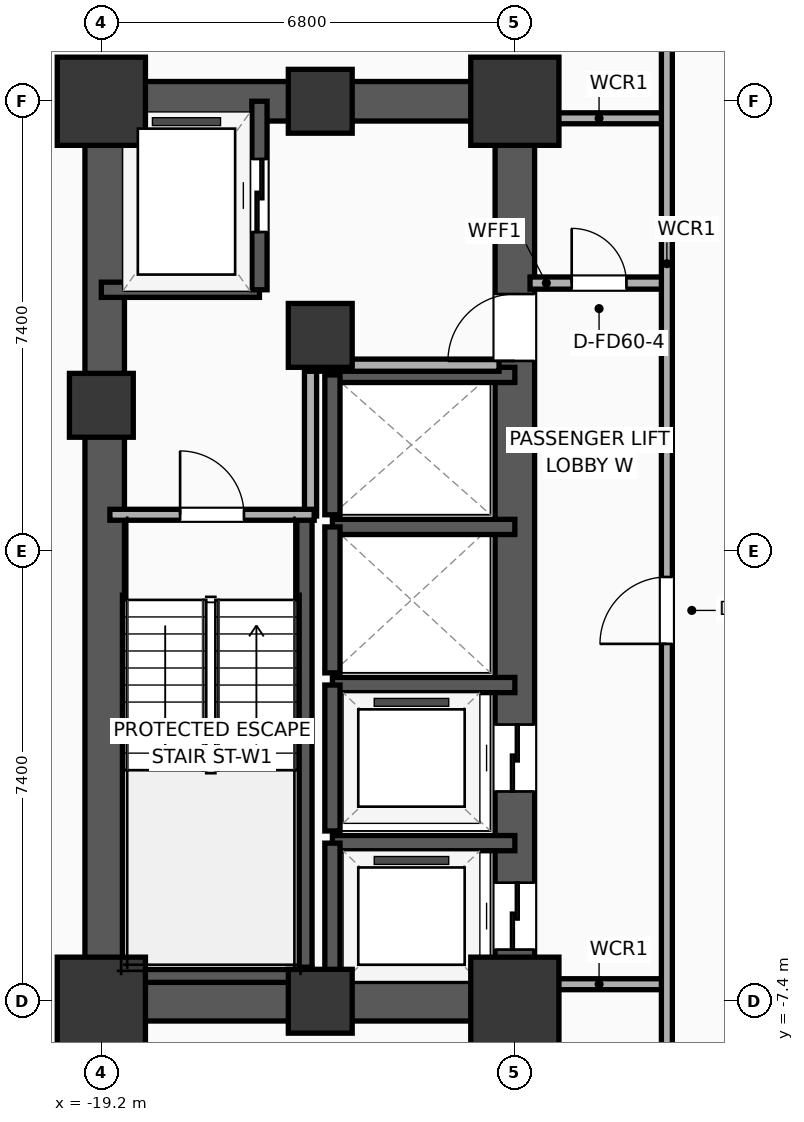
"""IFC4 building model, lengths in metres.
Left out: names, types, materials, properties, quantities, classifications, styles, units other than length and angle.
Written with IfcOpenShell. Run it as: python <this file> out.ifc"""

import sys

from ifc_helpers import new_model, si_unit, direction, frame, frame_2d, origin, origin_2d, place, context, subcontext, project, spatial, rectangle, extrude, element, fill, save


model = new_model("IFC4")
c1 = context("Model", 3, precision=1e-05, world=origin(), true_north=direction((0.0, 1.0)))
c2 = subcontext(c1, "Body", "Model", "MODEL_VIEW")
j1 = project(units=[si_unit("LENGTHUNIT", "METRE"), si_unit("PLANEANGLEUNIT", "RADIAN")], contexts=[c1])
p1 = place(None, origin())
s1 = spatial("IfcSite", under=j1, at=p1, CompositionType="ELEMENT")
p2 = place(p1, origin())
s2 = spatial("IfcBuilding", under=s1, at=p2, CompositionType="ELEMENT")
p3 = place(p2, frame((0.0, 0.0, 76.7)))
s3 = spatial("IfcBuildingStorey", under=s2, at=p3, CompositionType="ELEMENT", Elevation=76.7)
p4 = place(p3, frame((-19.2, -7.4, 0.0), z_axis=(0.0, 0.0, 1.0), x_axis=(1.0, 0.0, 0.0)))
e1 = element("IfcColumn", 1, at=p4, inside=s3, PredefinedType="COLUMN", context=c2, shape_type="SweptSolid", body=[
    extrude(rectangle(XDim=1.45, YDim=1.45, at=origin_2d()), origin(), (0.0, 0.0, 1.0), 3.9),
])
p5 = place(p3, frame((-19.2, 2.4, 0.0), z_axis=(0.0, 0.0, 1.0), x_axis=(1.0, 0.0, 0.0)))
e2 = element("IfcColumn", 2, at=p5, inside=s3, PredefinedType="COLUMN", context=c2, shape_type="SweptSolid", body=[
    extrude(rectangle(XDim=1.05, YDim=1.05, at=origin_2d()), origin(), (0.0, 0.0, 1.0), 3.9),
])
p6 = place(p3, frame((-19.2, 7.4, 0.0), z_axis=(0.0, 0.0, 1.0), x_axis=(1.0, 0.0, 0.0)))
e3 = element("IfcColumn", 3, at=p6, inside=s3, PredefinedType="COLUMN", context=c2, shape_type="SweptSolid", body=[
    extrude(rectangle(XDim=1.45, YDim=1.45, at=origin_2d()), origin(), (0.0, 0.0, 1.0), 3.9),
])
for number, where, z_axis, x_axis in (
    (4, (-15.6, -7.4, 0.0), (0.0, 0.0, 1.0), (1.0, 0.0, 0.0)),
    (5, (-15.6, 7.4, 0.0), (0.0, 0.0, 1.0), (1.0, 0.0, 0.0)),
):
    element("IfcColumn", number, at=place(p3, frame(where, z_axis=z_axis, x_axis=x_axis)), inside=s3, PredefinedType="COLUMN", context=c2, shape_type="SweptSolid", body=[
        extrude(rectangle(XDim=1.05, YDim=1.05, at=origin_2d()), origin(), (0.0, 0.0, 1.0), 3.9),
    ])
p7 = place(p3, frame((-12.4, -7.4, 0.0), z_axis=(0.0, 0.0, 1.0), x_axis=(1.0, 0.0, 0.0)))
e6 = element("IfcColumn", 6, at=p7, inside=s3, PredefinedType="COLUMN", context=c2, shape_type="SweptSolid", body=[
    extrude(rectangle(XDim=1.45, YDim=1.45, at=origin_2d()), origin(), (0.0, 0.0, 1.0), 3.9),
])
p8 = place(p3, frame((-15.6, 3.55, 0.0), z_axis=(0.0, 0.0, 1.0), x_axis=(1.0, 0.0, 0.0)))
e7 = element("IfcColumn", 7, at=p8, inside=s3, PredefinedType="COLUMN", context=c2, shape_type="SweptSolid", body=[
    extrude(rectangle(XDim=1.05, YDim=1.05, at=origin_2d()), origin(), (0.0, 0.0, 1.0), 3.9),
])
p9 = place(p3, frame((-12.4, 7.4, 0.0), z_axis=(0.0, 0.0, 1.0), x_axis=(1.0, 0.0, 0.0)))
e8 = element("IfcColumn", 8, at=p9, inside=s3, PredefinedType="COLUMN", context=c2, shape_type="SweptSolid", body=[
    extrude(rectangle(XDim=1.45, YDim=1.45, at=origin_2d()), origin(), (0.0, 0.0, 1.0), 3.9),
])
for number, where, z_axis, x_axis in (
    (9, (-19.525, -7.4, 0.0), (0.0, 0.0, 1.0), (1.0, 0.0, 0.0)),
    (10, (-19.525, 7.4, 0.0), (0.0, 0.0, 1.0), (1.0, 0.0, 0.0)),
):
    element("IfcWall", number, at=place(p3, frame(where, z_axis=z_axis, x_axis=x_axis)), inside=s3, PredefinedType="SHEAR", context=c2, shape_type="SweptSolid", body=[
        extrude(rectangle(XDim=7.45, YDim=0.65, at=frame_2d((3.725, 0.0))), origin(), (0.0, 0.0, 1.0), 3.6),
    ])
p10 = place(p3, frame((-19.145, -7.4, 0.0), z_axis=(0.0, 0.0, 1.0), x_axis=(0.0, 1.0, 0.0)))
e11 = element("IfcWall", 11, at=p10, inside=s3, PredefinedType="SHEAR", context=c2, shape_type="SweptSolid", body=[
    extrude(rectangle(XDim=14.8, YDim=0.65, at=frame_2d((7.4, 0.0))), origin(), (0.0, 0.0, 1.0), 3.6),
])
p11 = place(p3, frame((-12.4, -7.4, 0.0), z_axis=(0.0, 0.0, 1.0), x_axis=(0.0, 1.0, 0.0)))
e12 = element("IfcWall", 12, at=p11, inside=s3, PredefinedType="SHEAR", context=c2, shape_type="SweptSolid", body=[
    extrude(rectangle(XDim=14.8, YDim=0.65, at=frame_2d((7.4, 0.0))), origin(), (0.0, 0.0, 1.0), 3.6),
])
p12 = place(p11, frame((0.85, 0.0, 0.0)))
e13 = element("IfcOpeningElement", 13, at=p12, cuts=e12, PredefinedType="OPENING", context=c2, shape_type="SweptSolid", body=[
    extrude(rectangle(XDim=1.1, YDim=2.05, at=frame_2d((0.55, 1.025))), frame((0.0, 0.335, 0.0), z_axis=(0.0, -1.0, 0.0), x_axis=(1.0, 0.0, 0.0)), (0.0, 0.0, 1.0), 0.67),
])
p13 = place(p11, frame((3.45, 0.0, 0.0)))
e14 = element("IfcOpeningElement", 14, at=p13, cuts=e12, PredefinedType="OPENING", context=c2, shape_type="SweptSolid", body=[
    extrude(rectangle(XDim=1.1, YDim=2.05, at=frame_2d((0.55, 1.025))), frame((0.0, 0.335, 0.0), z_axis=(0.0, -1.0, 0.0), x_axis=(1.0, 0.0, 0.0)), (0.0, 0.0, 1.0), 0.67),
])
p14 = place(p11, frame((10.53, 0.0, 0.0)))
e15 = element("IfcOpeningElement", 15, at=p14, cuts=e12, PredefinedType="OPENING", context=c2, shape_type="SweptSolid", body=[
    extrude(rectangle(XDim=1.1, YDim=2.05, at=frame_2d((0.55, 1.025))), frame((0.0, 0.335, 0.0), z_axis=(0.0, -1.0, 0.0), x_axis=(1.0, 0.0, 0.0)), (0.0, 0.0, 1.0), 0.67),
])
p15 = place(p3, frame((-15.86, -7.085, 0.0), z_axis=(0.0, 0.0, 1.0), x_axis=(0.0, 1.0, 0.0)))
e16 = element("IfcWall", 16, at=p15, inside=s3, PredefinedType="SOLIDWALL", context=c2, shape_type="SweptSolid", body=[
    extrude(rectangle(XDim=7.685, YDim=0.25, at=frame_2d((3.843, 0.0))), origin(), (0.0, 0.0, 1.0), 3.6),
])
p16 = place(p3, frame((-19.2, -6.965, 0.0), z_axis=(0.0, 0.0, 1.0), x_axis=(1.0, 0.0, 0.0)))
e17 = element("IfcWall", 17, at=p16, inside=s3, PredefinedType="SOLIDWALL", context=c2, shape_type="SweptSolid", body=[
    extrude(rectangle(XDim=3.46, YDim=0.25, at=frame_2d((1.73, 0.0))), origin(), (0.0, 0.0, 1.0), 3.6),
])
p17 = place(p3, frame((-19.2, 4.3, 0.0), z_axis=(0.0, 0.0, 1.0), x_axis=(1.0, 0.0, 0.0)))
e18 = element("IfcWall", 18, at=p17, inside=s3, PredefinedType="SOLIDWALL", context=c2, shape_type="SweptSolid", body=[
    extrude(rectangle(XDim=2.6, YDim=0.25, at=frame_2d((1.3, 0.0))), origin(), (0.0, 0.0, 1.0), 3.6),
])
p18 = place(p3, frame((-16.6, 4.3, 0.0), z_axis=(0.0, 0.0, 1.0), x_axis=(0.0, 1.0, 0.0)))
e19 = element("IfcWall", 19, at=p18, inside=s3, PredefinedType="SOLIDWALL", context=c2, shape_type="SweptSolid", body=[
    extrude(rectangle(XDim=3.1, YDim=0.25, at=frame_2d((1.55, 0.0))), origin(), (0.0, 0.0, 1.0), 3.6),
])
p19 = place(p18, frame((0.95, 0.0, 0.0)))
e20 = element("IfcOpeningElement", 20, at=p19, cuts=e19, PredefinedType="OPENING", context=c2, shape_type="SweptSolid", body=[
    extrude(rectangle(XDim=1.2, YDim=2.05, at=frame_2d((0.6, 1.025))), frame((0.0, 0.135, 0.0), z_axis=(0.0, -1.0, 0.0), x_axis=(1.0, 0.0, 0.0)), (0.0, 0.0, 1.0), 0.27),
])
p20 = place(p3, frame((-12.4, -4.8, 0.0), z_axis=(0.0, 0.0, 1.0), x_axis=(-1.0, 0.0, 0.0)))
e21 = element("IfcWall", 21, at=p20, inside=s3, PredefinedType="SOLIDWALL", context=c2, shape_type="SweptSolid", body=[
    extrude(rectangle(XDim=3.0, YDim=0.25, at=frame_2d((1.5, 0.0))), origin(), (0.0, 0.0, 1.0), 3.6),
])
p21 = place(p3, frame((-15.4, -4.8, 0.0), z_axis=(0.0, 0.0, 1.0), x_axis=(0.0, -1.0, 0.0)))
e22 = element("IfcWall", 22, at=p21, inside=s3, PredefinedType="SOLIDWALL", context=c2, shape_type="SweptSolid", body=[
    extrude(rectangle(XDim=2.6, YDim=0.25, at=frame_2d((1.3, 0.0))), origin(), (0.0, 0.0, 1.0), 3.6),
])
p22 = place(p3, frame((-12.4, -2.2, 0.0), z_axis=(0.0, 0.0, 1.0), x_axis=(-1.0, 0.0, 0.0)))
e23 = element("IfcWall", 23, at=p22, inside=s3, PredefinedType="SOLIDWALL", context=c2, shape_type="SweptSolid", body=[
    extrude(rectangle(XDim=3.0, YDim=0.25, at=frame_2d((1.5, 0.0))), origin(), (0.0, 0.0, 1.0), 3.6),
])
p23 = place(p3, frame((-15.4, -2.2, 0.0), z_axis=(0.0, 0.0, 1.0), x_axis=(0.0, -1.0, 0.0)))
e24 = element("IfcWall", 24, at=p23, inside=s3, PredefinedType="SOLIDWALL", context=c2, shape_type="SweptSolid", body=[
    extrude(rectangle(XDim=2.4, YDim=0.25, at=frame_2d((1.2, 0.0))), origin(), (0.0, 0.0, 1.0), 3.6),
])
p24 = place(p3, frame((-12.4, 0.4, 0.0), z_axis=(0.0, 0.0, 1.0), x_axis=(-1.0, 0.0, 0.0)))
e25 = element("IfcWall", 25, at=p24, inside=s3, PredefinedType="SOLIDWALL", context=c2, shape_type="SweptSolid", body=[
    extrude(rectangle(XDim=3.0, YDim=0.25, at=frame_2d((1.5, 0.0))), origin(), (0.0, 0.0, 1.0), 3.6),
])
p25 = place(p3, frame((-15.4, 0.4, 0.0), z_axis=(0.0, 0.0, 1.0), x_axis=(0.0, -1.0, 0.0)))
e26 = element("IfcWall", 26, at=p25, inside=s3, PredefinedType="SOLIDWALL", context=c2, shape_type="SweptSolid", body=[
    extrude(rectangle(XDim=2.4, YDim=0.25, at=frame_2d((1.2, 0.0))), origin(), (0.0, 0.0, 1.0), 3.6),
])
p26 = place(p3, frame((-12.4, 2.9, 0.0), z_axis=(0.0, 0.0, 1.0), x_axis=(-1.0, 0.0, 0.0)))
e27 = element("IfcWall", 27, at=p26, inside=s3, PredefinedType="SOLIDWALL", context=c2, shape_type="SweptSolid", body=[
    extrude(rectangle(XDim=3.0, YDim=0.25, at=frame_2d((1.5, 0.0))), origin(), (0.0, 0.0, 1.0), 3.6),
])
p27 = place(p3, frame((-15.4, 2.9, 0.0), z_axis=(0.0, 0.0, 1.0), x_axis=(0.0, -1.0, 0.0)))
e28 = element("IfcWall", 28, at=p27, inside=s3, PredefinedType="SOLIDWALL", context=c2, shape_type="SweptSolid", body=[
    extrude(rectangle(XDim=2.3, YDim=0.25, at=frame_2d((1.15, 0.0))), origin(), (0.0, 0.0, 1.0), 3.6),
])
p28 = place(p3, frame((-15.76, 0.58, 0.0), z_axis=(0.0, 0.0, 1.0), x_axis=(0.0, 1.0, 0.0)))
e29 = element("IfcWall", 29, at=p28, inside=s3, PredefinedType="PARTITIONING", context=c2, shape_type="SweptSolid", body=[
    extrude(rectangle(XDim=2.52, YDim=0.2, at=frame_2d((1.26, 0.0))), origin(), (0.0, 0.0, 1.0), 3.6),
])
p29 = place(p3, frame((-15.82, 3.06, 0.0), z_axis=(0.0, 0.0, 1.0), x_axis=(1.0, 0.0, 0.0)))
e30 = element("IfcWall", 30, at=p29, inside=s3, PredefinedType="PARTITIONING", context=c2, shape_type="SweptSolid", body=[
    extrude(rectangle(XDim=3.16, YDim=0.2, at=frame_2d((1.58, 0.0))), origin(), (0.0, 0.0, 1.0), 3.6),
])
p30 = place(p3, frame((-19.06, 0.6, 0.0), z_axis=(0.0, 0.0, 1.0), x_axis=(1.0, 0.0, 0.0)))
e31 = element("IfcWall", 31, at=p30, inside=s3, PredefinedType="PARTITIONING", context=c2, shape_type="SweptSolid", body=[
    extrude(rectangle(XDim=3.36, YDim=0.18, at=frame_2d((1.68, 0.0))), origin(), (0.0, 0.0, 1.0), 3.6),
])
p31 = place(p30, frame((1.155, 0.0, 0.0)))
e32 = element("IfcOpeningElement", 32, at=p31, cuts=e31, PredefinedType="OPENING", context=c2, shape_type="SweptSolid", body=[
    extrude(rectangle(XDim=1.05, YDim=2.05, at=frame_2d((0.525, 1.025))), frame((0.0, 0.1, 0.0), z_axis=(0.0, -1.0, 0.0), x_axis=(1.0, 0.0, 0.0)), (0.0, 0.0, 1.0), 0.2),
])
p32 = place(p3, frame((-12.15, 4.41, 0.0), z_axis=(0.0, 0.0, 1.0), x_axis=(1.0, 0.0, 0.0)))
e33 = element("IfcWall", 33, at=p32, inside=s3, PredefinedType="PARTITIONING", context=c2, shape_type="SweptSolid", body=[
    extrude(rectangle(XDim=2.27, YDim=0.2, at=frame_2d((1.135, 0.0))), origin(), (0.0, 0.0, 1.0), 3.6),
])
p33 = place(p32, frame((0.685, 0.0, 0.0)))
e34 = element("IfcOpeningElement", 34, at=p33, cuts=e33, PredefinedType="OPENING", context=c2, shape_type="SweptSolid", body=[
    extrude(rectangle(XDim=0.9, YDim=2.05, at=frame_2d((0.45, 1.025))), frame((0.0, 0.11, 0.0), z_axis=(0.0, -1.0, 0.0), x_axis=(1.0, 0.0, 0.0)), (0.0, 0.0, 1.0), 0.22),
])
for number, where, z_axis, x_axis in (
    (35, (-12.15, 7.12, 0.0), (0.0, 0.0, 1.0), (1.0, 0.0, 0.0)),
    (36, (-12.15, -7.12, 0.0), (0.0, 0.0, 1.0), (1.0, 0.0, 0.0)),
):
    element("IfcWall", number, at=place(p3, frame(where, z_axis=z_axis, x_axis=x_axis)), inside=s3, PredefinedType="PARTITIONING", context=c2, shape_type="SweptSolid", body=[
        extrude(rectangle(XDim=2.27, YDim=0.18, at=frame_2d((1.135, 0.0))), origin(), (0.0, 0.0, 1.0), 2.89),
    ])
p34 = place(p3, frame((-9.9, -9.73, 0.0), z_axis=(0.0, 0.0, 1.0), x_axis=(0.0, 1.0, 0.0)))
e37 = element("IfcWall", 37, at=p34, inside=s3, PredefinedType="PARTITIONING", context=c2, shape_type="SweptSolid", body=[
    extrude(rectangle(XDim=19.46, YDim=0.18, at=frame_2d((9.73, 0.0))), origin(), (0.0, 0.0, 1.0), 3.6),
])
p35 = place(p34, frame((8.207, 0.0, 0.0)))
e38 = element("IfcOpeningElement", 38, at=p35, cuts=e37, PredefinedType="OPENING", context=c2, shape_type="SweptSolid", body=[
    extrude(rectangle(XDim=1.1, YDim=2.05, at=frame_2d((0.55, 1.025))), frame((0.0, 0.1, 0.0), z_axis=(0.0, -1.0, 0.0), x_axis=(1.0, 0.0, 0.0)), (0.0, 0.0, 1.0), 0.2),
])
p36 = place(p19, origin())
e39 = element("IfcDoor", 39, at=p36, inside=s3, OperationType="SLIDING_TO_LEFT", PredefinedType="DOOR", context=c2, shape_type="SweptSolid", body=[
    extrude(rectangle(XDim=1.2, YDim=2.05, at=frame_2d((0.6, 1.025))), frame((0.0, 0.025, 0.0), z_axis=(0.0, -1.0, 0.0), x_axis=(1.0, 0.0, 0.0)), (0.0, 0.0, 1.0), 0.05),
])
fill(e20, e39)
p37 = place(p12, origin())
e40 = element("IfcDoor", 40, at=p37, inside=s3, OperationType="SLIDING_TO_LEFT", PredefinedType="DOOR", context=c2, shape_type="SweptSolid", body=[
    extrude(rectangle(XDim=1.1, YDim=2.05, at=frame_2d((0.55, 1.025))), frame((0.0, 0.025, 0.0), z_axis=(0.0, -1.0, 0.0), x_axis=(1.0, 0.0, 0.0)), (0.0, 0.0, 1.0), 0.05),
])
fill(e13, e40)
p38 = place(p13, origin())
e41 = element("IfcDoor", 41, at=p38, inside=s3, OperationType="SLIDING_TO_LEFT", PredefinedType="DOOR", context=c2, shape_type="SweptSolid", body=[
    extrude(rectangle(XDim=1.1, YDim=2.05, at=frame_2d((0.55, 1.025))), frame((0.0, 0.025, 0.0), z_axis=(0.0, -1.0, 0.0), x_axis=(1.0, 0.0, 0.0)), (0.0, 0.0, 1.0), 0.05),
])
fill(e14, e41)
p39 = place(p31, origin())
e42 = element("IfcDoor", 42, at=p39, inside=s3, OperationType="SINGLE_SWING_LEFT", PredefinedType="DOOR", context=c2, shape_type="SweptSolid", body=[
    extrude(rectangle(XDim=1.05, YDim=2.05, at=frame_2d((0.525, 1.025))), frame((0.0, 0.025, 0.0), z_axis=(0.0, -1.0, 0.0), x_axis=(1.0, 0.0, 0.0)), (0.0, 0.0, 1.0), 0.05),
])
fill(e32, e42)
p40 = place(p33, origin())
e43 = element("IfcDoor", 43, at=p40, inside=s3, OperationType="SINGLE_SWING_LEFT", PredefinedType="DOOR", context=c2, shape_type="SweptSolid", body=[
    extrude(rectangle(XDim=0.9, YDim=2.05, at=frame_2d((0.45, 1.025))), frame((0.0, 0.025, 0.0), z_axis=(0.0, -1.0, 0.0), x_axis=(1.0, 0.0, 0.0)), (0.0, 0.0, 1.0), 0.05),
])
fill(e34, e43)
p41 = place(p35, origin())
e44 = element("IfcDoor", 44, at=p41, inside=s3, OperationType="SINGLE_SWING_LEFT", PredefinedType="DOOR", context=c2, shape_type="SweptSolid", body=[
    extrude(rectangle(XDim=1.1, YDim=2.05, at=frame_2d((0.55, 1.025))), frame((0.0, 0.025, 0.0), z_axis=(0.0, -1.0, 0.0), x_axis=(1.0, 0.0, 0.0)), (0.0, 0.0, 1.0), 0.05),
])
fill(e38, e44)
p42 = place(p14, origin())
e45 = element("IfcDoor", 45, at=p42, inside=s3, OperationType="SINGLE_SWING_LEFT", PredefinedType="DOOR", context=c2, shape_type="SweptSolid", body=[
    extrude(rectangle(XDim=1.1, YDim=2.05, at=frame_2d((0.55, 1.025))), frame((0.0, 0.025, 0.0), z_axis=(0.0, -1.0, 0.0), x_axis=(1.0, 0.0, 0.0)), (0.0, 0.0, 1.0), 0.05),
])
fill(e15, e45)
save(model, sys.argv[1])
